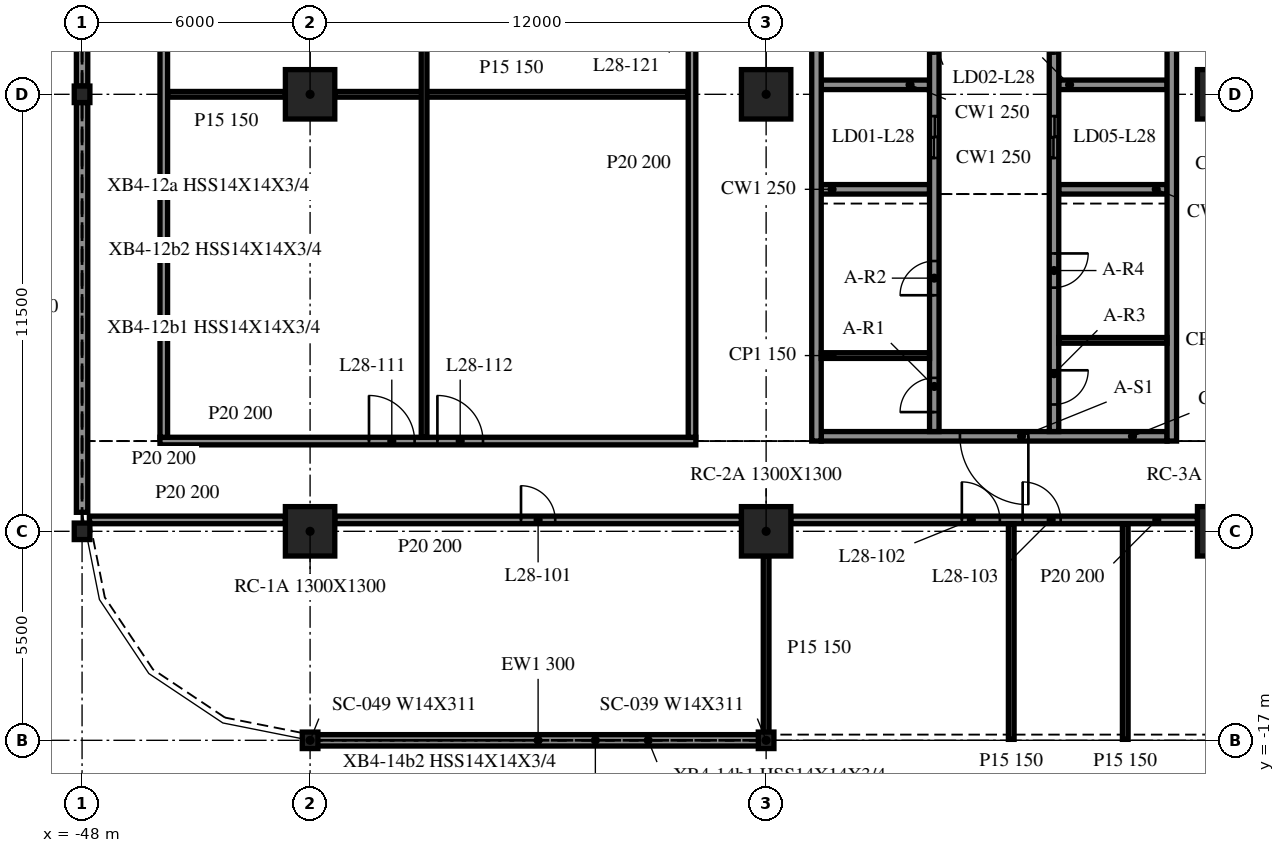
"""IFC4 building model, lengths in metres.
Left out: names, types, materials, properties, quantities, classifications, styles, units other than length and angle.
Written with IfcOpenShell. Run it as: python <this file> out.ifc"""

import sys

from ifc_helpers import new_model, si_unit, direction, frame, frame_2d, origin, origin_2d, place, context, subcontext, project, spatial, rectangle, i_section, extrude, element, fill, save


model = new_model("IFC4")
c1 = context("Model", 3, precision=1e-05, world=origin(), true_north=direction((0.0, 1.0)))
c2 = subcontext(c1, "Body", "Model", "MODEL_VIEW")
j1 = project(units=[si_unit("LENGTHUNIT", "METRE"), si_unit("PLANEANGLEUNIT", "RADIAN")], contexts=[c1])
p1 = place(None, origin())
s1 = spatial("IfcSite", under=j1, at=p1, CompositionType="ELEMENT")
p2 = place(p1, origin())
s2 = spatial("IfcBuilding", under=s1, at=p2, CompositionType="ELEMENT")
p3 = place(p2, frame((0.0, 0.0, 122.0)))
s3 = spatial("IfcBuildingStorey", under=s2, at=p3, CompositionType="ELEMENT", Elevation=122.0)
for number, where, z_axis, x_axis in (
    (1, (-42.0, -11.5, -0.34), (0.0, 0.0, 1.0), (1.0, 0.0, 0.0)),
    (2, (-42.0, 0.0, -0.34), (0.0, 0.0, 1.0), (1.0, 0.0, 0.0)),
    (3, (-30.0, -11.5, -0.34), (0.0, 0.0, 1.0), (1.0, 0.0, 0.0)),
    (4, (-30.0, 0.0, -0.34), (0.0, 0.0, 1.0), (1.0, 0.0, 0.0)),
    (5, (-18.0, -11.5, -0.34), (0.0, 0.0, 1.0), (1.0, 0.0, 0.0)),
    (6, (-18.0, 0.0, -0.34), (0.0, 0.0, 1.0), (1.0, 0.0, 0.0)),
):
    element("IfcColumn", number, at=place(p3, frame(where, z_axis=z_axis, x_axis=x_axis)), inside=s3, PredefinedType="COLUMN", context=c2, shape_type="SweptSolid", body=[
        extrude(rectangle(XDim=1.3, YDim=1.3, at=origin_2d()), origin(), (0.0, 0.0, 1.0), 4.1),
    ])
for number, where, z_axis, x_axis in (
    (7, (-48.0, 0.0, -0.34), (0.0, 0.0, 1.0), (1.0, 0.0, 0.0)),
    (8, (-48.0, -11.5, -0.34), (0.0, 0.0, 1.0), (1.0, 0.0, 0.0)),
    (9, (-42.0, -17.0, -0.34), (0.0, 0.0, 1.0), (1.0, 0.0, 0.0)),
    (10, (-30.0, -17.0, -0.34), (0.0, 0.0, 1.0), (1.0, 0.0, 0.0)),
):
    element("IfcColumn", number, at=place(p3, frame(where, z_axis=z_axis, x_axis=x_axis)), inside=s3, PredefinedType="COLUMN", context=c2, shape_type="SweptSolid", body=[
        extrude(i_section(OverallWidth=0.412, OverallDepth=0.434, WebThickness=0.036, FlangeThickness=0.057, at=origin_2d()), origin(), (0.0, 0.0, 1.0), 4.1),
    ])
p4 = place(p3, frame((-48.0, 11.282, 0.0), z_axis=(0.0, 0.0, 1.0), x_axis=(0.0, -1.0, 0.0)))
e11 = element("IfcWall", 11, at=p4, inside=s3, PredefinedType="NOTDEFINED", context=c2, shape_type="SweptSolid", body=[
    extrude(rectangle(XDim=11.064, YDim=0.3, at=frame_2d((5.532, 0.0))), origin(), (0.0, 0.0, 1.0), 3.003),
])
p5 = place(p3, frame((-48.0, -0.218, 0.0), z_axis=(0.0, 0.0, 1.0), x_axis=(0.0, -1.0, 0.0)))
e12 = element("IfcWall", 12, at=p5, inside=s3, PredefinedType="NOTDEFINED", context=c2, shape_type="SweptSolid", body=[
    extrude(rectangle(XDim=10.782, YDim=0.3, at=frame_2d((5.391, 0.0))), origin(), (0.0, 0.0, 1.0), 3.003),
])
p6 = place(p3, frame((-41.982, -17.0, 0.0), z_axis=(0.0, 0.0, 1.0), x_axis=(1.0, 0.0, 0.0)))
e13 = element("IfcWall", 13, at=p6, inside=s3, PredefinedType="NOTDEFINED", context=c2, shape_type="SweptSolid", body=[
    extrude(rectangle(XDim=11.964, YDim=0.3, at=frame_2d((5.982, 0.0))), origin(), (0.0, 0.0, 1.0), 3.003),
])
for number, where, z_axis, x_axis in (
    (14, (-28.675, 15.125, 0.0), (0.0, 0.0, 1.0), (0.0, -1.0, 0.0)),
    (15, (-19.325, -9.125, 0.0), (0.0, 0.0, 1.0), (0.0, 1.0, 0.0)),
):
    element("IfcWall", number, at=place(p3, frame(where, z_axis=z_axis, x_axis=x_axis)), inside=s3, PredefinedType="SOLIDWALL", context=c2, shape_type="SweptSolid", body=[
        extrude(rectangle(XDim=24.25, YDim=0.25, at=frame_2d((12.125, 0.0))), origin(), (0.0, 0.0, 1.0), 3.76),
    ])
p7 = place(p3, frame((-19.45, -9.0, 0.0), z_axis=(0.0, 0.0, 1.0), x_axis=(-1.0, 0.0, 0.0)))
e16 = element("IfcWall", 16, at=p7, inside=s3, PredefinedType="SOLIDWALL", context=c2, shape_type="SweptSolid", body=[
    extrude(rectangle(XDim=9.1, YDim=0.25, at=frame_2d((4.55, 0.0))), origin(), (0.0, 0.0, 1.0), 3.76),
])
p8 = place(p7, frame((3.65, 0.0, 0.0)))
e17 = element("IfcOpeningElement", 17, at=p8, cuts=e16, PredefinedType="OPENING", context=c2, shape_type="SweptSolid", body=[
    extrude(rectangle(XDim=1.8, YDim=2.1, at=frame_2d((0.9, 1.05))), frame((0.0, 0.135, 0.0), z_axis=(0.0, -1.0, 0.0), x_axis=(1.0, 0.0, 0.0)), (0.0, 0.0, 1.0), 0.27),
])
p9 = place(p3, frame((-25.575, -8.875, 0.0), z_axis=(0.0, 0.0, 1.0), x_axis=(0.0, 1.0, 0.0)))
e18 = element("IfcWall", 18, at=p9, inside=s3, PredefinedType="SOLIDWALL", context=c2, shape_type="SweptSolid", body=[
    extrude(rectangle(XDim=17.5, YDim=0.25, at=frame_2d((8.75, 0.0))), origin(), (0.0, 0.0, 1.0), 3.76),
])
p10 = place(p9, frame((7.2, 0.0, 0.0)))
e19 = element("IfcOpeningElement", 19, at=p10, cuts=e18, PredefinedType="OPENING", context=c2, shape_type="SweptSolid", body=[
    extrude(rectangle(XDim=1.1, YDim=2.1, at=frame_2d((0.55, 1.05))), frame((0.0, 0.135, 0.0), z_axis=(0.0, -1.0, 0.0), x_axis=(1.0, 0.0, 0.0)), (0.0, 0.0, 1.0), 0.27),
])
p11 = place(p9, frame((9.95, 0.0, 0.0)))
e20 = element("IfcOpeningElement", 20, at=p11, cuts=e18, PredefinedType="OPENING", context=c2, shape_type="SweptSolid", body=[
    extrude(rectangle(XDim=1.1, YDim=2.1, at=frame_2d((0.55, 1.05))), frame((0.0, 0.135, 0.0), z_axis=(0.0, -1.0, 0.0), x_axis=(1.0, 0.0, 0.0)), (0.0, 0.0, 1.0), 0.27),
])
p12 = place(p9, frame((12.7, 0.0, 0.0)))
e21 = element("IfcOpeningElement", 21, at=p12, cuts=e18, PredefinedType="OPENING", context=c2, shape_type="SweptSolid", body=[
    extrude(rectangle(XDim=1.1, YDim=2.1, at=frame_2d((0.55, 1.05))), frame((0.0, 0.135, 0.0), z_axis=(0.0, -1.0, 0.0), x_axis=(1.0, 0.0, 0.0)), (0.0, 0.0, 1.0), 0.27),
])
p13 = place(p9, frame((15.45, 0.0, 0.0)))
e22 = element("IfcOpeningElement", 22, at=p13, cuts=e18, PredefinedType="OPENING", context=c2, shape_type="SweptSolid", body=[
    extrude(rectangle(XDim=1.1, YDim=2.1, at=frame_2d((0.55, 1.05))), frame((0.0, 0.135, 0.0), z_axis=(0.0, -1.0, 0.0), x_axis=(1.0, 0.0, 0.0)), (0.0, 0.0, 1.0), 0.27),
])
p14 = place(p9, frame((0.512, 0.0, 0.0)))
e23 = element("IfcOpeningElement", 23, at=p14, cuts=e18, PredefinedType="OPENING", context=c2, shape_type="SweptSolid", body=[
    extrude(rectangle(XDim=0.9, YDim=2.1, at=frame_2d((0.45, 1.05))), frame((0.0, 0.135, 0.0), z_axis=(0.0, -1.0, 0.0), x_axis=(1.0, 0.0, 0.0)), (0.0, 0.0, 1.0), 0.27),
])
p15 = place(p9, frame((3.587, 0.0, 0.0)))
e24 = element("IfcOpeningElement", 24, at=p15, cuts=e18, PredefinedType="OPENING", context=c2, shape_type="SweptSolid", body=[
    extrude(rectangle(XDim=0.9, YDim=2.1, at=frame_2d((0.45, 1.05))), frame((0.0, 0.135, 0.0), z_axis=(0.0, -1.0, 0.0), x_axis=(1.0, 0.0, 0.0)), (0.0, 0.0, 1.0), 0.27),
])
p16 = place(p3, frame((-22.425, 14.875, 0.0), z_axis=(0.0, 0.0, 1.0), x_axis=(0.0, -1.0, 0.0)))
e25 = element("IfcWall", 25, at=p16, inside=s3, PredefinedType="SOLIDWALL", context=c2, shape_type="SweptSolid", body=[
    extrude(rectangle(XDim=23.75, YDim=0.25, at=frame_2d((11.875, 0.0))), origin(), (0.0, 0.0, 1.0), 3.76),
])
p17 = place(p16, frame((15.45, 0.0, 0.0)))
e26 = element("IfcOpeningElement", 26, at=p17, cuts=e25, PredefinedType="OPENING", context=c2, shape_type="SweptSolid", body=[
    extrude(rectangle(XDim=1.1, YDim=2.1, at=frame_2d((0.55, 1.05))), frame((0.0, 0.135, 0.0), z_axis=(0.0, -1.0, 0.0), x_axis=(1.0, 0.0, 0.0)), (0.0, 0.0, 1.0), 0.27),
])
p18 = place(p16, frame((12.7, 0.0, 0.0)))
e27 = element("IfcOpeningElement", 27, at=p18, cuts=e25, PredefinedType="OPENING", context=c2, shape_type="SweptSolid", body=[
    extrude(rectangle(XDim=1.1, YDim=2.1, at=frame_2d((0.55, 1.05))), frame((0.0, 0.135, 0.0), z_axis=(0.0, -1.0, 0.0), x_axis=(1.0, 0.0, 0.0)), (0.0, 0.0, 1.0), 0.27),
])
p19 = place(p16, frame((22.137, 0.0, 0.0)))
e28 = element("IfcOpeningElement", 28, at=p19, cuts=e25, PredefinedType="OPENING", context=c2, shape_type="SweptSolid", body=[
    extrude(rectangle(XDim=0.9, YDim=2.1, at=frame_2d((0.45, 1.05))), frame((0.0, 0.135, 0.0), z_axis=(0.0, -1.0, 0.0), x_axis=(1.0, 0.0, 0.0)), (0.0, 0.0, 1.0), 0.27),
])
p20 = place(p16, frame((19.062, 0.0, 0.0)))
e29 = element("IfcOpeningElement", 29, at=p20, cuts=e25, PredefinedType="OPENING", context=c2, shape_type="SweptSolid", body=[
    extrude(rectangle(XDim=0.9, YDim=2.1, at=frame_2d((0.45, 1.05))), frame((0.0, 0.135, 0.0), z_axis=(0.0, -1.0, 0.0), x_axis=(1.0, 0.0, 0.0)), (0.0, 0.0, 1.0), 0.27),
])
p21 = place(p16, frame((2.55, 0.0, 0.0)))
e30 = element("IfcOpeningElement", 30, at=p21, cuts=e25, PredefinedType="OPENING", context=c2, shape_type="SweptSolid", body=[
    extrude(rectangle(XDim=0.9, YDim=2.1, at=frame_2d((0.45, 1.05))), frame((0.0, 0.135, 0.0), z_axis=(0.0, -1.0, 0.0), x_axis=(1.0, 0.0, 0.0)), (0.0, 0.0, 1.0), 0.27),
])
for number, where, z_axis, x_axis in (
    (31, (-28.55, -2.5, 0.0), (0.0, 0.0, 1.0), (1.0, 0.0, 0.0)),
    (32, (-28.55, 0.25, 0.0), (0.0, 0.0, 1.0), (1.0, 0.0, 0.0)),
    (33, (-22.3, -2.5, 0.0), (0.0, 0.0, 1.0), (1.0, 0.0, 0.0)),
    (34, (-22.3, 0.25, 0.0), (0.0, 0.0, 1.0), (1.0, 0.0, 0.0)),
):
    element("IfcWall", number, at=place(p3, frame(where, z_axis=z_axis, x_axis=x_axis)), inside=s3, PredefinedType="SOLIDWALL", context=c2, shape_type="SweptSolid", body=[
        extrude(rectangle(XDim=2.85, YDim=0.25, at=frame_2d((1.425, 0.0))), origin(), (0.0, 0.0, 1.0), 3.76),
    ])
for number, where, z_axis, x_axis in (
    (35, (-28.55, -6.875, 0.0), (0.0, 0.0, 1.0), (1.0, 0.0, 0.0)),
    (36, (-22.3, -6.475, 0.0), (0.0, 0.0, 1.0), (1.0, 0.0, 0.0)),
):
    element("IfcWall", number, at=place(p3, frame(where, z_axis=z_axis, x_axis=x_axis)), inside=s3, PredefinedType="PARTITIONING", context=c2, shape_type="SweptSolid", body=[
        extrude(rectangle(XDim=2.85, YDim=0.15, at=frame_2d((1.425, 0.0))), origin(), (0.0, 0.0, 1.0), 3.76),
    ])
p22 = place(p3, frame((-47.807, -11.2, 0.0), z_axis=(0.0, 0.0, 1.0), x_axis=(1.0, 0.0, 0.0)))
e37 = element("IfcWall", 37, at=p22, inside=s3, PredefinedType="PARTITIONING", context=c2, shape_type="SweptSolid", body=[
    extrude(rectangle(XDim=5.157, YDim=0.2, at=frame_2d((2.579, 0.0))), origin(), (0.0, 0.0, 1.0), 3.76),
])
p23 = place(p3, frame((-41.35, -11.2, 0.0), z_axis=(0.0, 0.0, 1.0), x_axis=(1.0, 0.0, 0.0)))
e38 = element("IfcWall", 38, at=p23, inside=s3, PredefinedType="PARTITIONING", context=c2, shape_type="SweptSolid", body=[
    extrude(rectangle(XDim=10.7, YDim=0.2, at=frame_2d((5.35, 0.0))), origin(), (0.0, 0.0, 1.0), 3.76),
])
p24 = place(p23, frame((4.9, 0.0, 0.0)))
e39 = element("IfcOpeningElement", 39, at=p24, cuts=e38, PredefinedType="OPENING", context=c2, shape_type="SweptSolid", body=[
    extrude(rectangle(XDim=0.9, YDim=2.1, at=frame_2d((0.45, 1.05))), frame((0.0, 0.11, 0.0), z_axis=(0.0, -1.0, 0.0), x_axis=(1.0, 0.0, 0.0)), (0.0, 0.0, 1.0), 0.22),
])
p25 = place(p3, frame((-29.35, -11.2, 0.0), z_axis=(0.0, 0.0, 1.0), x_axis=(1.0, 0.0, 0.0)))
e40 = element("IfcWall", 40, at=p25, inside=s3, PredefinedType="PARTITIONING", context=c2, shape_type="SweptSolid", body=[
    extrude(rectangle(XDim=10.7, YDim=0.2, at=frame_2d((5.35, 0.0))), origin(), (0.0, 0.0, 1.0), 3.76),
])
p26 = place(p25, frame((4.5, 0.0, 0.0)))
e41 = element("IfcOpeningElement", 41, at=p26, cuts=e40, PredefinedType="OPENING", context=c2, shape_type="SweptSolid", body=[
    extrude(rectangle(XDim=1.0, YDim=2.1, at=frame_2d((0.5, 1.05))), frame((0.0, 0.11, 0.0), z_axis=(0.0, -1.0, 0.0), x_axis=(1.0, 0.0, 0.0)), (0.0, 0.0, 1.0), 0.22),
])
p27 = place(p25, frame((6.1, 0.0, 0.0)))
e42 = element("IfcOpeningElement", 42, at=p27, cuts=e40, PredefinedType="OPENING", context=c2, shape_type="SweptSolid", body=[
    extrude(rectangle(XDim=1.0, YDim=2.1, at=frame_2d((0.5, 1.05))), frame((0.0, 0.11, 0.0), z_axis=(0.0, -1.0, 0.0), x_axis=(1.0, 0.0, 0.0)), (0.0, 0.0, 1.0), 0.22),
])
p28 = place(p3, frame((-45.95, -9.125, 0.0), z_axis=(0.0, 0.0, 1.0), x_axis=(1.0, 0.0, 0.0)))
e43 = element("IfcWall", 43, at=p28, inside=s3, PredefinedType="PARTITIONING", context=c2, shape_type="SweptSolid", body=[
    extrude(rectangle(XDim=14.1, YDim=0.2, at=frame_2d((7.05, 0.0))), origin(), (0.0, 0.0, 1.0), 3.76),
])
p29 = place(p28, frame((5.5, 0.0, 0.0)))
e44 = element("IfcOpeningElement", 44, at=p29, cuts=e43, PredefinedType="OPENING", context=c2, shape_type="SweptSolid", body=[
    extrude(rectangle(XDim=1.2, YDim=2.1, at=frame_2d((0.6, 1.05))), frame((0.0, 0.11, 0.0), z_axis=(0.0, -1.0, 0.0), x_axis=(1.0, 0.0, 0.0)), (0.0, 0.0, 1.0), 0.22),
])
p30 = place(p28, frame((7.3, 0.0, 0.0)))
e45 = element("IfcOpeningElement", 45, at=p30, cuts=e43, PredefinedType="OPENING", context=c2, shape_type="SweptSolid", body=[
    extrude(rectangle(XDim=1.2, YDim=2.1, at=frame_2d((0.6, 1.05))), frame((0.0, 0.11, 0.0), z_axis=(0.0, -1.0, 0.0), x_axis=(1.0, 0.0, 0.0)), (0.0, 0.0, 1.0), 0.22),
])
p31 = place(p3, frame((-45.75, 0.0, 0.0), z_axis=(0.0, 0.0, 1.0), x_axis=(1.0, 0.0, 0.0)))
e46 = element("IfcWall", 46, at=p31, inside=s3, PredefinedType="PARTITIONING", context=c2, shape_type="SweptSolid", body=[
    extrude(rectangle(XDim=3.1, YDim=0.15, at=frame_2d((1.55, 0.0))), origin(), (0.0, 0.0, 1.0), 3.76),
])
p32 = place(p3, frame((-41.35, 0.0, 0.0), z_axis=(0.0, 0.0, 1.0), x_axis=(1.0, 0.0, 0.0)))
e47 = element("IfcWall", 47, at=p32, inside=s3, PredefinedType="PARTITIONING", context=c2, shape_type="SweptSolid", body=[
    extrude(rectangle(XDim=9.3, YDim=0.15, at=frame_2d((4.65, 0.0))), origin(), (0.0, 0.0, 1.0), 3.76),
])
p33 = place(p3, frame((-45.85, -9.025, 0.0), z_axis=(0.0, 0.0, 1.0), x_axis=(0.0, 1.0, 0.0)))
e48 = element("IfcWall", 48, at=p33, inside=s3, PredefinedType="PARTITIONING", context=c2, shape_type="SweptSolid", body=[
    extrude(rectangle(XDim=24.05, YDim=0.2, at=frame_2d((12.025, 0.0))), origin(), (0.0, 0.0, 1.0), 3.76),
])
p34 = place(p33, frame((11.5, 0.0, 0.0)))
e49 = element("IfcOpeningElement", 49, at=p34, cuts=e48, PredefinedType="OPENING", context=c2, shape_type="SweptSolid", body=[
    extrude(rectangle(XDim=1.2, YDim=2.1, at=frame_2d((0.6, 1.05))), frame((0.0, 0.11, 0.0), z_axis=(0.0, -1.0, 0.0), x_axis=(1.0, 0.0, 0.0)), (0.0, 0.0, 1.0), 0.22),
])
p35 = place(p3, frame((-39.0, -9.025, 0.0), z_axis=(0.0, 0.0, 1.0), x_axis=(0.0, 1.0, 0.0)))
e50 = element("IfcWall", 50, at=p35, inside=s3, PredefinedType="PARTITIONING", context=c2, shape_type="SweptSolid", body=[
    extrude(rectangle(XDim=24.05, YDim=0.15, at=frame_2d((12.025, 0.0))), origin(), (0.0, 0.0, 1.0), 3.76),
])
p36 = place(p3, frame((-31.95, -9.025, 0.0), z_axis=(0.0, 0.0, 1.0), x_axis=(0.0, 1.0, 0.0)))
e51 = element("IfcWall", 51, at=p36, inside=s3, PredefinedType="PARTITIONING", context=c2, shape_type="SweptSolid", body=[
    extrude(rectangle(XDim=24.05, YDim=0.2, at=frame_2d((12.025, 0.0))), origin(), (0.0, 0.0, 1.0), 3.76),
])
p37 = place(p36, frame((11.5, 0.0, 0.0)))
e52 = element("IfcOpeningElement", 52, at=p37, cuts=e51, PredefinedType="OPENING", context=c2, shape_type="SweptSolid", body=[
    extrude(rectangle(XDim=1.2, YDim=2.1, at=frame_2d((0.6, 1.05))), frame((0.0, 0.11, 0.0), z_axis=(0.0, -1.0, 0.0), x_axis=(1.0, 0.0, 0.0)), (0.0, 0.0, 1.0), 0.22),
])
p38 = place(p3, frame((-30.0, -16.975, 0.0), z_axis=(0.0, 0.0, 1.0), x_axis=(0.0, 1.0, 0.0)))
e53 = element("IfcWall", 53, at=p38, inside=s3, PredefinedType="PARTITIONING", context=c2, shape_type="SweptSolid", body=[
    extrude(rectangle(XDim=4.825, YDim=0.15, at=frame_2d((2.413, 0.0))), origin(), (0.0, 0.0, 1.0), 3.76),
])
for number, where, z_axis, x_axis in (
    (54, (-23.55, -16.975, 0.0), (0.0, 0.0, 1.0), (0.0, 1.0, 0.0)),
    (55, (-20.55, -16.975, 0.0), (0.0, 0.0, 1.0), (0.0, 1.0, 0.0)),
):
    element("IfcWall", number, at=place(p3, frame(where, z_axis=z_axis, x_axis=x_axis)), inside=s3, PredefinedType="PARTITIONING", context=c2, shape_type="SweptSolid", body=[
        extrude(rectangle(XDim=5.675, YDim=0.15, at=frame_2d((2.837, 0.0))), origin(), (0.0, 0.0, 1.0), 3.76),
    ])
p39 = place(p8, origin())
e56 = element("IfcDoor", 56, at=p39, inside=s3, OperationType="DOUBLE_DOOR_SINGLE_SWING", PredefinedType="DOOR", context=c2, shape_type="SweptSolid", body=[
    extrude(rectangle(XDim=1.8, YDim=2.1, at=frame_2d((0.9, 1.05))), frame((0.0, 0.025, 0.0), z_axis=(0.0, -1.0, 0.0), x_axis=(1.0, 0.0, 0.0)), (0.0, 0.0, 1.0), 0.05),
])
fill(e17, e56)
p40 = place(p17, origin())
e57 = element("IfcDoor", 57, at=p40, inside=s3, OperationType="DOUBLE_DOOR_SLIDING", PredefinedType="DOOR", context=c2, shape_type="SweptSolid", body=[
    extrude(rectangle(XDim=1.1, YDim=2.1, at=frame_2d((0.55, 1.05))), frame((0.0, 0.025, 0.0), z_axis=(0.0, -1.0, 0.0), x_axis=(1.0, 0.0, 0.0)), (0.0, 0.0, 1.0), 0.05),
])
fill(e26, e57)
p41 = place(p18, origin())
e58 = element("IfcDoor", 58, at=p41, inside=s3, OperationType="DOUBLE_DOOR_SLIDING", PredefinedType="DOOR", context=c2, shape_type="SweptSolid", body=[
    extrude(rectangle(XDim=1.1, YDim=2.1, at=frame_2d((0.55, 1.05))), frame((0.0, 0.025, 0.0), z_axis=(0.0, -1.0, 0.0), x_axis=(1.0, 0.0, 0.0)), (0.0, 0.0, 1.0), 0.05),
])
fill(e27, e58)
p42 = place(p10, origin())
e59 = element("IfcDoor", 59, at=p42, inside=s3, OperationType="DOUBLE_DOOR_SLIDING", PredefinedType="DOOR", context=c2, shape_type="SweptSolid", body=[
    extrude(rectangle(XDim=1.1, YDim=2.1, at=frame_2d((0.55, 1.05))), frame((0.0, 0.025, 0.0), z_axis=(0.0, -1.0, 0.0), x_axis=(1.0, 0.0, 0.0)), (0.0, 0.0, 1.0), 0.05),
])
fill(e19, e59)
p43 = place(p11, origin())
e60 = element("IfcDoor", 60, at=p43, inside=s3, OperationType="DOUBLE_DOOR_SLIDING", PredefinedType="DOOR", context=c2, shape_type="SweptSolid", body=[
    extrude(rectangle(XDim=1.1, YDim=2.1, at=frame_2d((0.55, 1.05))), frame((0.0, 0.025, 0.0), z_axis=(0.0, -1.0, 0.0), x_axis=(1.0, 0.0, 0.0)), (0.0, 0.0, 1.0), 0.05),
])
fill(e20, e60)
p44 = place(p14, origin())
e61 = element("IfcDoor", 61, at=p44, inside=s3, OperationType="SINGLE_SWING_LEFT", PredefinedType="DOOR", context=c2, shape_type="SweptSolid", body=[
    extrude(rectangle(XDim=0.9, YDim=2.1, at=frame_2d((0.45, 1.05))), frame((0.0, 0.025, 0.0), z_axis=(0.0, -1.0, 0.0), x_axis=(1.0, 0.0, 0.0)), (0.0, 0.0, 1.0), 0.05),
])
fill(e23, e61)
p45 = place(p15, origin())
e62 = element("IfcDoor", 62, at=p45, inside=s3, OperationType="SINGLE_SWING_RIGHT", PredefinedType="DOOR", context=c2, shape_type="SweptSolid", body=[
    extrude(rectangle(XDim=0.9, YDim=2.1, at=frame_2d((0.45, 1.05))), frame((0.0, 0.025, 0.0), z_axis=(0.0, -1.0, 0.0), x_axis=(1.0, 0.0, 0.0)), (0.0, 0.0, 1.0), 0.05),
])
fill(e24, e62)
p46 = place(p19, origin())
e63 = element("IfcDoor", 63, at=p46, inside=s3, OperationType="SINGLE_SWING_LEFT", PredefinedType="DOOR", context=c2, shape_type="SweptSolid", body=[
    extrude(rectangle(XDim=0.9, YDim=2.1, at=frame_2d((0.45, 1.05))), frame((0.0, 0.025, 0.0), z_axis=(0.0, -1.0, 0.0), x_axis=(1.0, 0.0, 0.0)), (0.0, 0.0, 1.0), 0.05),
])
fill(e28, e63)
p47 = place(p20, origin())
e64 = element("IfcDoor", 64, at=p47, inside=s3, OperationType="SINGLE_SWING_RIGHT", PredefinedType="DOOR", context=c2, shape_type="SweptSolid", body=[
    extrude(rectangle(XDim=0.9, YDim=2.1, at=frame_2d((0.45, 1.05))), frame((0.0, 0.025, 0.0), z_axis=(0.0, -1.0, 0.0), x_axis=(1.0, 0.0, 0.0)), (0.0, 0.0, 1.0), 0.05),
])
fill(e29, e64)
p48 = place(p24, origin())
e65 = element("IfcDoor", 65, at=p48, inside=s3, OperationType="SINGLE_SWING_RIGHT", PredefinedType="DOOR", context=c2, shape_type="SweptSolid", body=[
    extrude(rectangle(XDim=0.9, YDim=2.1, at=frame_2d((0.45, 1.05))), frame((0.0, 0.025, 0.0), z_axis=(0.0, -1.0, 0.0), x_axis=(1.0, 0.0, 0.0)), (0.0, 0.0, 1.0), 0.05),
])
fill(e39, e65)
p49 = place(p26, origin())
e66 = element("IfcDoor", 66, at=p49, inside=s3, OperationType="SINGLE_SWING_RIGHT", PredefinedType="DOOR", context=c2, shape_type="SweptSolid", body=[
    extrude(rectangle(XDim=1.0, YDim=2.1, at=frame_2d((0.5, 1.05))), frame((0.0, 0.025, 0.0), z_axis=(0.0, -1.0, 0.0), x_axis=(1.0, 0.0, 0.0)), (0.0, 0.0, 1.0), 0.05),
])
fill(e41, e66)
p50 = place(p27, origin())
e67 = element("IfcDoor", 67, at=p50, inside=s3, OperationType="SINGLE_SWING_LEFT", PredefinedType="DOOR", context=c2, shape_type="SweptSolid", body=[
    extrude(rectangle(XDim=1.0, YDim=2.1, at=frame_2d((0.5, 1.05))), frame((0.0, 0.025, 0.0), z_axis=(0.0, -1.0, 0.0), x_axis=(1.0, 0.0, 0.0)), (0.0, 0.0, 1.0), 0.05),
])
fill(e42, e67)
p51 = place(p29, origin())
e68 = element("IfcDoor", 68, at=p51, inside=s3, OperationType="SINGLE_SWING_LEFT", PredefinedType="DOOR", context=c2, shape_type="SweptSolid", body=[
    extrude(rectangle(XDim=1.2, YDim=2.1, at=frame_2d((0.6, 1.05))), frame((0.0, 0.025, 0.0), z_axis=(0.0, -1.0, 0.0), x_axis=(1.0, 0.0, 0.0)), (0.0, 0.0, 1.0), 0.05),
])
fill(e44, e68)
p52 = place(p30, origin())
e69 = element("IfcDoor", 69, at=p52, inside=s3, OperationType="SINGLE_SWING_RIGHT", PredefinedType="DOOR", context=c2, shape_type="SweptSolid", body=[
    extrude(rectangle(XDim=1.2, YDim=2.1, at=frame_2d((0.6, 1.05))), frame((0.0, 0.025, 0.0), z_axis=(0.0, -1.0, 0.0), x_axis=(1.0, 0.0, 0.0)), (0.0, 0.0, 1.0), 0.05),
])
fill(e45, e69)
save(model, sys.argv[1])
